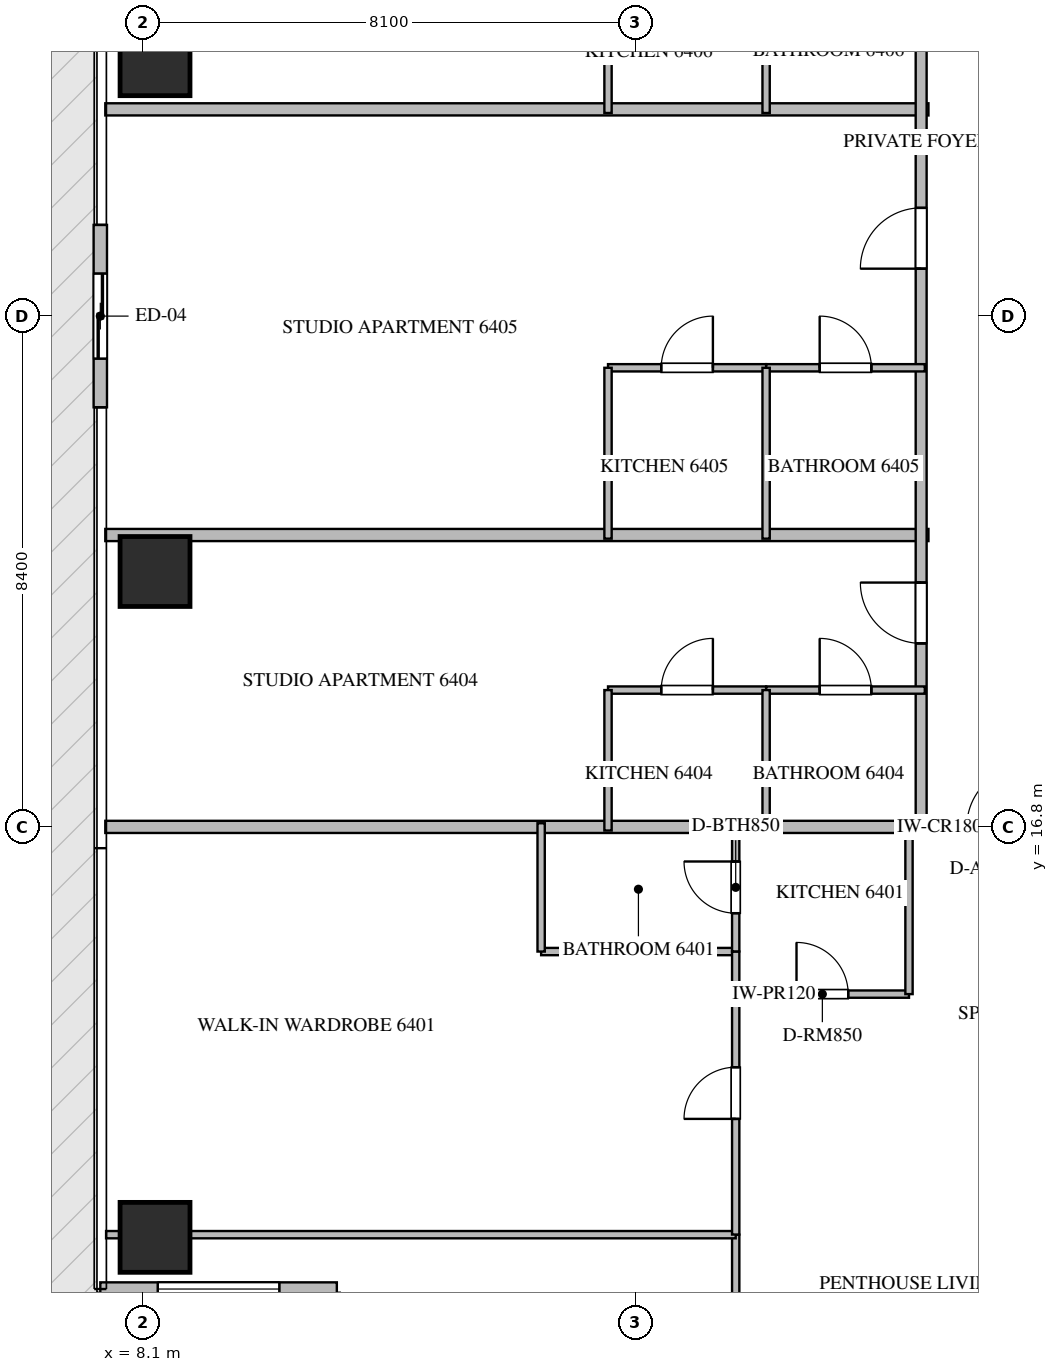
"""IFC4 building model, lengths in metres.
Left out: names, types, materials, properties, quantities, classifications, styles, units other than length and angle.
Written with IfcOpenShell. Run it as: python <this file> out.ifc"""

import sys

from ifc_helpers import new_model, si_unit, direction, frame, frame_2d, origin, origin_2d, place, context, subcontext, project, spatial, rectangle, extrude, source, transform, mapped, element, fill, save


model = new_model("IFC4")
c1 = context("Model", 3, precision=1e-05, world=origin(), true_north=direction((0.0, 1.0)))
c2 = subcontext(c1, "Body", "Model", "MODEL_VIEW")
j1 = project(units=[si_unit("LENGTHUNIT", "METRE"), si_unit("PLANEANGLEUNIT", "RADIAN")], contexts=[c1])
p1 = place(None, origin())
s1 = spatial("IfcSite", under=j1, at=p1, CompositionType="ELEMENT")
p2 = place(p1, origin())
s2 = spatial("IfcBuilding", under=s1, at=p2, CompositionType="ELEMENT")
p3 = place(p2, frame((0.0, 0.0, 256.65)))
s3 = spatial("IfcBuildingStorey", under=s2, at=p3, CompositionType="ELEMENT", Elevation=256.65)
m1 = source(origin(), c2, "Body", "SweptSolid", [
    extrude(rectangle(XDim=1.15, YDim=1.15, at=origin_2d()), origin(), (0.0, 0.0, 1.0), 3.85),
])
for number, where, z_axis, x_axis in (
    (1, (8.3, 10.05, -0.26), (0.0, 0.0, 1.0), (1.0, 0.0, 0.0)),
    (2, (8.3, 21.0, -0.26), (0.0, 0.0, 1.0), (1.0, 0.0, 0.0)),
    (3, (8.3, 29.4, -0.26), (0.0, 0.0, 1.0), (1.0, 0.0, 0.0)),
):
    element("IfcColumn", number, at=place(p3, frame(where, z_axis=z_axis, x_axis=x_axis)), inside=s3, PredefinedType="COLUMN", context=c2, shape_type="MappedRepresentation", body=[
        mapped(m1, transform((0.0, 0.0, 0.0), scale=1.0)),
    ])
p4 = place(p3, frame((7.4, 26.7, 0.0), z_axis=(0.0, 0.0, 1.0), x_axis=(0.0, -1.0, 0.0)))
e4 = element("IfcWall", 4, at=p4, inside=s3, PredefinedType="ELEMENTEDWALL", context=c2, shape_type="SweptSolid", body=[
    extrude(rectangle(XDim=3.0, YDim=0.22, at=frame_2d((1.5, 0.0))), origin(), (0.0, 0.0, 1.0), 3.575),
])
p5 = place(p4, frame((0.8, 0.0, 0.0)))
e5 = element("IfcOpeningElement", 5, at=p5, cuts=e4, PredefinedType="OPENING", context=c2, shape_type="SweptSolid", body=[
    extrude(rectangle(XDim=1.4, YDim=2.25, at=frame_2d((0.7, 1.125))), frame((0.0, 0.12, 0.0), z_axis=(0.0, -1.0, 0.0), x_axis=(1.0, 0.0, 0.0)), (0.0, 0.0, 1.0), 0.24),
])
p6 = place(p3, frame((7.4, 9.2, 0.0), z_axis=(0.0, 0.0, 1.0), x_axis=(1.0, 0.0, 0.0)))
e6 = element("IfcWall", 6, at=p6, inside=s3, PredefinedType="ELEMENTEDWALL", context=c2, shape_type="SweptSolid", body=[
    extrude(rectangle(XDim=3.89, YDim=0.22, at=frame_2d((1.945, 0.0))), origin(), (0.0, 0.0, 1.0), 3.575),
])
p7 = place(p6, frame((0.945, 0.0, 0.65)))
e7 = element("IfcOpeningElement", 7, at=p7, cuts=e6, PredefinedType="OPENING", context=c2, shape_type="SweptSolid", body=[
    extrude(rectangle(XDim=2.0, YDim=2.2, at=frame_2d((1.0, 1.1))), frame((0.0, 0.12, 0.0), z_axis=(0.0, -1.0, 0.0), x_axis=(1.0, 0.0, 0.0)), (0.0, 0.0, 1.0), 0.24),
])
for number, where, z_axis, x_axis in (
    (8, (7.482, 21.6, 0.0), (0.0, 0.0, 1.0), (1.0, 0.0, 0.0)),
    (9, (7.482, 28.6, 0.0), (0.0, 0.0, 1.0), (1.0, 0.0, 0.0)),
):
    element("IfcWall", number, at=place(p3, frame(where, z_axis=z_axis, x_axis=x_axis)), inside=s3, PredefinedType="PARTITIONING", context=c2, shape_type="SweptSolid", body=[
        extrude(rectangle(XDim=13.538, YDim=0.2, at=frame_2d((6.769, 0.0))), origin(), (0.0, 0.0, 1.0), 3.59),
    ])
p8 = place(p3, frame((7.482, 16.8, 0.0), z_axis=(0.0, 0.0, 1.0), x_axis=(1.0, 0.0, 0.0)))
e10 = element("IfcWall", 10, at=p8, inside=s3, PredefinedType="PARTITIONING", context=c2, shape_type="SweptSolid", body=[
    extrude(rectangle(XDim=13.418, YDim=0.2, at=frame_2d((6.709, 0.0))), origin(), (0.0, 0.0, 1.0), 3.59),
])
p9 = place(p3, frame((20.902, 16.8, 0.0), z_axis=(0.0, 0.0, 1.0), x_axis=(1.0, 0.0, 0.0)))
e11 = element("IfcWall", 11, at=p9, inside=s3, PredefinedType="PARTITIONING", context=c2, shape_type="SweptSolid", body=[
    extrude(rectangle(XDim=2.496, YDim=0.18, at=frame_2d((1.248, 0.0))), origin(), (0.0, 0.0, 1.0), 3.59),
])
p10 = place(p9, frame((0.748, 0.0, 0.0)))
e12 = element("IfcOpeningElement", 12, at=p10, cuts=e11, PredefinedType="OPENING", context=c2, shape_type="SweptSolid", body=[
    extrude(rectangle(XDim=1.0, YDim=2.15, at=frame_2d((0.5, 1.075))), frame((0.0, 0.1, 0.0), z_axis=(0.0, -1.0, 0.0), x_axis=(1.0, 0.0, 0.0)), (0.0, 0.0, 1.0), 0.2),
])
p11 = place(p3, frame((20.9, 16.8, 0.0), z_axis=(0.0, 0.0, 1.0), x_axis=(0.0, 1.0, 0.0)))
e13 = element("IfcWall", 13, at=p11, inside=s3, PredefinedType="PARTITIONING", context=c2, shape_type="SweptSolid", body=[
    extrude(rectangle(XDim=16.8, YDim=0.18, at=frame_2d((8.4, 0.0))), origin(), (0.0, 0.0, 1.0), 3.59),
])
p12 = place(p11, frame((3.018, 0.0, 0.0)))
e14 = element("IfcOpeningElement", 14, at=p12, cuts=e13, PredefinedType="OPENING", context=c2, shape_type="SweptSolid", body=[
    extrude(rectangle(XDim=1.0, YDim=2.15, at=frame_2d((0.5, 1.075))), frame((0.0, 0.1, 0.0), z_axis=(0.0, -1.0, 0.0), x_axis=(1.0, 0.0, 0.0)), (0.0, 0.0, 1.0), 0.2),
])
p13 = place(p11, frame((9.18, 0.0, 0.0)))
e15 = element("IfcOpeningElement", 15, at=p13, cuts=e13, PredefinedType="OPENING", context=c2, shape_type="SweptSolid", body=[
    extrude(rectangle(XDim=1.0, YDim=2.15, at=frame_2d((0.5, 1.075))), frame((0.0, 0.1, 0.0), z_axis=(0.0, -1.0, 0.0), x_axis=(1.0, 0.0, 0.0)), (0.0, 0.0, 1.0), 0.2),
])
p14 = place(p11, frame((14.5, 0.0, 0.0)))
e16 = element("IfcOpeningElement", 16, at=p14, cuts=e13, PredefinedType="OPENING", context=c2, shape_type="SweptSolid", body=[
    extrude(rectangle(XDim=1.0, YDim=2.15, at=frame_2d((0.5, 1.075))), frame((0.0, 0.1, 0.0), z_axis=(0.0, -1.0, 0.0), x_axis=(1.0, 0.0, 0.0)), (0.0, 0.0, 1.0), 0.2),
])
p15 = place(p3, frame((17.85, 14.05, 0.0), z_axis=(0.0, 0.0, 1.0), x_axis=(1.0, 0.0, 0.0)))
e17 = element("IfcWall", 17, at=p15, inside=s3, PredefinedType="PARTITIONING", context=c2, shape_type="SweptSolid", body=[
    extrude(rectangle(XDim=2.85, YDim=0.12, at=frame_2d((1.425, 0.0))), origin(), (0.0, 0.0, 1.0), 3.59),
])
p16 = place(p15, frame((1.0, 0.0, 0.0)))
e18 = element("IfcOpeningElement", 18, at=p16, cuts=e17, PredefinedType="OPENING", context=c2, shape_type="SweptSolid", body=[
    extrude(rectangle(XDim=0.85, YDim=2.1, at=frame_2d((0.425, 1.05))), frame((0.0, 0.07, 0.0), z_axis=(0.0, -1.0, 0.0), x_axis=(1.0, 0.0, 0.0)), (0.0, 0.0, 1.0), 0.14),
])
p17 = place(p3, frame((20.7, 14.05, 0.0), z_axis=(0.0, 0.0, 1.0), x_axis=(0.0, 1.0, 0.0)))
e19 = element("IfcWall", 19, at=p17, inside=s3, PredefinedType="PARTITIONING", context=c2, shape_type="SweptSolid", body=[
    extrude(rectangle(XDim=2.81, YDim=0.12, at=frame_2d((1.405, 0.0))), origin(), (0.0, 0.0, 1.0), 3.59),
])
p18 = place(p3, frame((17.85, 1.295, 0.0), z_axis=(0.0, 0.0, 1.0), x_axis=(0.0, 1.0, 0.0)))
e20 = element("IfcWall", 20, at=p18, inside=s3, PredefinedType="PARTITIONING", context=c2, shape_type="SweptSolid", body=[
    extrude(rectangle(XDim=8.799, YDim=0.12, at=frame_2d((4.399, 0.0))), origin(), (0.0, 0.0, 1.0), 3.59),
])
p19 = place(p18, frame((4.344, 0.0, 0.0)))
e21 = element("IfcOpeningElement", 21, at=p19, cuts=e20, PredefinedType="OPENING", context=c2, shape_type="SweptSolid", body=[
    extrude(rectangle(XDim=0.9, YDim=2.1, at=frame_2d((0.45, 1.05))), frame((0.0, 0.07, 0.0), z_axis=(0.0, -1.0, 0.0), x_axis=(1.0, 0.0, 0.0)), (0.0, 0.0, 1.0), 0.14),
])
p20 = place(p3, frame((7.495, 10.094, 0.0), z_axis=(0.0, 0.0, 1.0), x_axis=(1.0, 0.0, 0.0)))
e22 = element("IfcWall", 22, at=p20, inside=s3, PredefinedType="PARTITIONING", context=c2, shape_type="SweptSolid", body=[
    extrude(rectangle(XDim=10.355, YDim=0.12, at=frame_2d((5.177, 0.0))), origin(), (0.0, 0.0, 1.0), 3.122),
])
p21 = place(p3, frame((14.65, 14.75, 0.0), z_axis=(0.0, 0.0, 1.0), x_axis=(1.0, 0.0, 0.0)))
e23 = element("IfcWall", 23, at=p21, inside=s3, PredefinedType="PARTITIONING", context=c2, shape_type="SweptSolid", body=[
    extrude(rectangle(XDim=3.2, YDim=0.12, at=frame_2d((1.6, 0.0))), origin(), (0.0, 0.0, 1.0), 3.59),
])
p22 = place(p3, frame((14.65, 14.75, 0.0), z_axis=(0.0, 0.0, 1.0), x_axis=(0.0, 1.0, 0.0)))
e24 = element("IfcWall", 24, at=p22, inside=s3, PredefinedType="PARTITIONING", context=c2, shape_type="SweptSolid", body=[
    extrude(rectangle(XDim=2.11, YDim=0.12, at=frame_2d((1.055, 0.0))), origin(), (0.0, 0.0, 1.0), 3.59),
])
p23 = place(p3, frame((17.85, 10.096, 0.0), z_axis=(0.0, 0.0, 1.0), x_axis=(0.0, 1.0, 0.0)))
e25 = element("IfcWall", 25, at=p23, inside=s3, PredefinedType="PARTITIONING", context=c2, shape_type="SweptSolid", body=[
    extrude(rectangle(XDim=4.654, YDim=0.12, at=frame_2d((2.327, 0.0))), origin(), (0.0, 0.0, 1.0), 3.59),
])
p24 = place(p23, frame((1.902, 0.0, 0.0)))
e26 = element("IfcOpeningElement", 26, at=p24, cuts=e25, PredefinedType="OPENING", context=c2, shape_type="SweptSolid", body=[
    extrude(rectangle(XDim=0.85, YDim=2.1, at=frame_2d((0.425, 1.05))), frame((0.0, 0.07, 0.0), z_axis=(0.0, -1.0, 0.0), x_axis=(1.0, 0.0, 0.0)), (0.0, 0.0, 1.0), 0.14),
])
p25 = place(p3, frame((17.85, 14.752, 0.0), z_axis=(0.0, 0.0, 1.0), x_axis=(0.0, 1.0, 0.0)))
e27 = element("IfcWall", 27, at=p25, inside=s3, PredefinedType="PARTITIONING", context=c2, shape_type="SweptSolid", body=[
    extrude(rectangle(XDim=2.108, YDim=0.12, at=frame_2d((1.054, 0.0))), origin(), (0.0, 0.0, 1.0), 3.59),
])
p26 = place(p25, frame((0.629, 0.0, 0.0)))
e28 = element("IfcOpeningElement", 28, at=p26, cuts=e27, PredefinedType="OPENING", context=c2, shape_type="SweptSolid", body=[
    extrude(rectangle(XDim=0.85, YDim=2.1, at=frame_2d((0.425, 1.05))), frame((0.0, 0.07, 0.0), z_axis=(0.0, -1.0, 0.0), x_axis=(1.0, 0.0, 0.0)), (0.0, 0.0, 1.0), 0.14),
])
p27 = place(p3, frame((15.75, 19.05, 0.0), z_axis=(0.0, 0.0, 1.0), x_axis=(1.0, 0.0, 0.0)))
e29 = element("IfcWall", 29, at=p27, inside=s3, PredefinedType="PARTITIONING", context=c2, shape_type="SweptSolid", body=[
    extrude(rectangle(XDim=2.6, YDim=0.12, at=frame_2d((1.3, 0.0))), origin(), (0.0, 0.0, 1.0), 3.59),
])
p28 = place(p27, frame((0.875, 0.0, 0.0)))
e30 = element("IfcOpeningElement", 30, at=p28, cuts=e29, PredefinedType="OPENING", context=c2, shape_type="SweptSolid", body=[
    extrude(rectangle(XDim=0.85, YDim=2.1, at=frame_2d((0.425, 1.05))), frame((0.0, 0.07, 0.0), z_axis=(0.0, -1.0, 0.0), x_axis=(1.0, 0.0, 0.0)), (0.0, 0.0, 1.0), 0.14),
])
p29 = place(p3, frame((18.352, 19.05, 0.0), z_axis=(0.0, 0.0, 1.0), x_axis=(1.0, 0.0, 0.0)))
e31 = element("IfcWall", 31, at=p29, inside=s3, PredefinedType="PARTITIONING", context=c2, shape_type="SweptSolid", body=[
    extrude(rectangle(XDim=2.608, YDim=0.12, at=frame_2d((1.304, 0.0))), origin(), (0.0, 0.0, 1.0), 3.59),
])
p30 = place(p29, frame((0.879, 0.0, 0.0)))
e32 = element("IfcOpeningElement", 32, at=p30, cuts=e31, PredefinedType="OPENING", context=c2, shape_type="SweptSolid", body=[
    extrude(rectangle(XDim=0.85, YDim=2.1, at=frame_2d((0.425, 1.05))), frame((0.0, 0.07, 0.0), z_axis=(0.0, -1.0, 0.0), x_axis=(1.0, 0.0, 0.0)), (0.0, 0.0, 1.0), 0.14),
])
for number, where, z_axis, x_axis in (
    (33, (18.35, 16.74, 0.0), (0.0, 0.0, 1.0), (0.0, 1.0, 0.0)),
    (34, (15.75, 16.74, 0.0), (0.0, 0.0, 1.0), (0.0, 1.0, 0.0)),
):
    element("IfcWall", number, at=place(p3, frame(where, z_axis=z_axis, x_axis=x_axis)), inside=s3, PredefinedType="PARTITIONING", context=c2, shape_type="SweptSolid", body=[
        extrude(rectangle(XDim=2.31, YDim=0.12, at=frame_2d((1.155, 0.0))), origin(), (0.0, 0.0, 1.0), 3.59),
    ])
p31 = place(p3, frame((15.75, 24.35, 0.0), z_axis=(0.0, 0.0, 1.0), x_axis=(1.0, 0.0, 0.0)))
e35 = element("IfcWall", 35, at=p31, inside=s3, PredefinedType="PARTITIONING", context=c2, shape_type="SweptSolid", body=[
    extrude(rectangle(XDim=2.6, YDim=0.12, at=frame_2d((1.3, 0.0))), origin(), (0.0, 0.0, 1.0), 3.59),
])
p32 = place(p31, frame((0.875, 0.0, 0.0)))
e36 = element("IfcOpeningElement", 36, at=p32, cuts=e35, PredefinedType="OPENING", context=c2, shape_type="SweptSolid", body=[
    extrude(rectangle(XDim=0.85, YDim=2.1, at=frame_2d((0.425, 1.05))), frame((0.0, 0.07, 0.0), z_axis=(0.0, -1.0, 0.0), x_axis=(1.0, 0.0, 0.0)), (0.0, 0.0, 1.0), 0.14),
])
p33 = place(p3, frame((18.352, 24.35, 0.0), z_axis=(0.0, 0.0, 1.0), x_axis=(1.0, 0.0, 0.0)))
e37 = element("IfcWall", 37, at=p33, inside=s3, PredefinedType="PARTITIONING", context=c2, shape_type="SweptSolid", body=[
    extrude(rectangle(XDim=2.608, YDim=0.12, at=frame_2d((1.304, 0.0))), origin(), (0.0, 0.0, 1.0), 3.59),
])
p34 = place(p33, frame((0.879, 0.0, 0.0)))
e38 = element("IfcOpeningElement", 38, at=p34, cuts=e37, PredefinedType="OPENING", context=c2, shape_type="SweptSolid", body=[
    extrude(rectangle(XDim=0.85, YDim=2.1, at=frame_2d((0.425, 1.05))), frame((0.0, 0.07, 0.0), z_axis=(0.0, -1.0, 0.0), x_axis=(1.0, 0.0, 0.0)), (0.0, 0.0, 1.0), 0.14),
])
for number, where, z_axis, x_axis in (
    (39, (18.35, 21.54, 0.0), (0.0, 0.0, 1.0), (0.0, 1.0, 0.0)),
    (40, (15.75, 21.54, 0.0), (0.0, 0.0, 1.0), (0.0, 1.0, 0.0)),
):
    element("IfcWall", number, at=place(p3, frame(where, z_axis=z_axis, x_axis=x_axis)), inside=s3, PredefinedType="PARTITIONING", context=c2, shape_type="SweptSolid", body=[
        extrude(rectangle(XDim=2.81, YDim=0.12, at=frame_2d((1.405, 0.0))), origin(), (0.0, 0.0, 1.0), 3.59),
    ])
for number, where, z_axis, x_axis in (
    (41, (18.35, 28.54, 0.0), (0.0, 0.0, 1.0), (0.0, 1.0, 0.0)),
    (42, (15.75, 28.54, 0.0), (0.0, 0.0, 1.0), (0.0, 1.0, 0.0)),
):
    element("IfcWall", number, at=place(p3, frame(where, z_axis=z_axis, x_axis=x_axis)), inside=s3, PredefinedType="PARTITIONING", context=c2, shape_type="SweptSolid", body=[
        extrude(rectangle(XDim=2.46, YDim=0.12, at=frame_2d((1.23, 0.0))), origin(), (0.0, 0.0, 1.0), 3.59),
    ])
m2 = source(origin(), c2, "Body", "SweptSolid", [
    extrude(rectangle(XDim=1.4, YDim=2.25, at=frame_2d((0.7, 1.125))), frame((0.0, 0.025, 0.0), z_axis=(0.0, -1.0, 0.0), x_axis=(1.0, 0.0, 0.0)), (0.0, 0.0, 1.0), 0.05),
])
p35 = place(p5, origin())
e43 = element("IfcDoor", 43, at=p35, inside=s3, OperationType="SLIDING_TO_LEFT", PredefinedType="DOOR", context=c2, shape_type="MappedRepresentation", body=[
    mapped(m2, transform((0.0, 0.0, 0.0), scale=1.0)),
])
fill(e5, e43)
m3 = source(origin(), c2, "Body", "SweptSolid", [
    extrude(rectangle(XDim=2.0, YDim=2.2, at=frame_2d((1.0, 1.1))), frame((0.0, 0.03, 0.0), z_axis=(0.0, -1.0, 0.0), x_axis=(1.0, 0.0, 0.0)), (0.0, 0.0, 1.0), 0.06),
])
p36 = place(p7, origin())
e44 = element("IfcWindow", 44, at=p36, inside=s3, PartitioningType="SINGLE_PANEL", PredefinedType="WINDOW", context=c2, shape_type="MappedRepresentation", body=[
    mapped(m3, transform((0.0, 0.0, 0.0), scale=1.0)),
])
fill(e7, e44)
m4 = source(origin(), c2, "Body", "SweptSolid", [
    extrude(rectangle(XDim=1.0, YDim=2.15, at=frame_2d((0.5, 1.075))), frame((0.0, 0.025, 0.0), z_axis=(0.0, -1.0, 0.0), x_axis=(1.0, 0.0, 0.0)), (0.0, 0.0, 1.0), 0.05),
])
p37 = place(p10, origin())
e45 = element("IfcDoor", 45, at=p37, inside=s3, OperationType="SINGLE_SWING_RIGHT", PredefinedType="DOOR", context=c2, shape_type="MappedRepresentation", body=[
    mapped(m4, transform((0.0, 0.0, 0.0), scale=1.0)),
])
fill(e12, e45)
p38 = place(p12, origin())
e46 = element("IfcDoor", 46, at=p38, inside=s3, OperationType="SINGLE_SWING_RIGHT", PredefinedType="DOOR", context=c2, shape_type="MappedRepresentation", body=[
    mapped(m4, transform((0.0, 0.0, 0.0), scale=1.0)),
])
fill(e14, e46)
p39 = place(p13, origin())
e47 = element("IfcDoor", 47, at=p39, inside=s3, OperationType="SINGLE_SWING_LEFT", PredefinedType="DOOR", context=c2, shape_type="MappedRepresentation", body=[
    mapped(m4, transform((0.0, 0.0, 0.0), scale=1.0)),
])
fill(e15, e47)
m5 = source(origin(), c2, "Body", "SweptSolid", [
    extrude(rectangle(XDim=0.85, YDim=2.1, at=frame_2d((0.425, 1.05))), frame((0.0, 0.025, 0.0), z_axis=(0.0, -1.0, 0.0), x_axis=(1.0, 0.0, 0.0)), (0.0, 0.0, 1.0), 0.05),
])
p40 = place(p16, origin())
e48 = element("IfcDoor", 48, at=p40, inside=s3, OperationType="SINGLE_SWING_LEFT", PredefinedType="DOOR", context=c2, shape_type="MappedRepresentation", body=[
    mapped(m5, transform((0.0, 0.0, 0.0), scale=1.0)),
])
fill(e18, e48)
p41 = place(p24, origin())
e49 = element("IfcDoor", 49, at=p41, inside=s3, OperationType="SINGLE_SWING_LEFT", PredefinedType="DOOR", context=c2, shape_type="MappedRepresentation", body=[
    mapped(m5, transform((0.0, 0.0, 0.0), scale=1.0)),
])
fill(e26, e49)
p42 = place(p26, origin())
e50 = element("IfcDoor", 50, at=p42, inside=s3, OperationType="SINGLE_SWING_RIGHT", PredefinedType="DOOR", context=c2, shape_type="MappedRepresentation", body=[
    mapped(m5, transform((0.0, 0.0, 0.0), scale=1.0)),
])
fill(e28, e50)
p43 = place(p28, origin())
e51 = element("IfcDoor", 51, at=p43, inside=s3, OperationType="SINGLE_SWING_RIGHT", PredefinedType="DOOR", context=c2, shape_type="MappedRepresentation", body=[
    mapped(m5, transform((0.0, 0.0, 0.0), scale=1.0)),
])
fill(e30, e51)
p44 = place(p30, origin())
e52 = element("IfcDoor", 52, at=p44, inside=s3, OperationType="SINGLE_SWING_LEFT", PredefinedType="DOOR", context=c2, shape_type="MappedRepresentation", body=[
    mapped(m5, transform((0.0, 0.0, 0.0), scale=1.0)),
])
fill(e32, e52)
p45 = place(p32, origin())
e53 = element("IfcDoor", 53, at=p45, inside=s3, OperationType="SINGLE_SWING_RIGHT", PredefinedType="DOOR", context=c2, shape_type="MappedRepresentation", body=[
    mapped(m5, transform((0.0, 0.0, 0.0), scale=1.0)),
])
fill(e36, e53)
p46 = place(p34, origin())
e54 = element("IfcDoor", 54, at=p46, inside=s3, OperationType="SINGLE_SWING_LEFT", PredefinedType="DOOR", context=c2, shape_type="MappedRepresentation", body=[
    mapped(m5, transform((0.0, 0.0, 0.0), scale=1.0)),
])
fill(e38, e54)
save(model, sys.argv[1])
